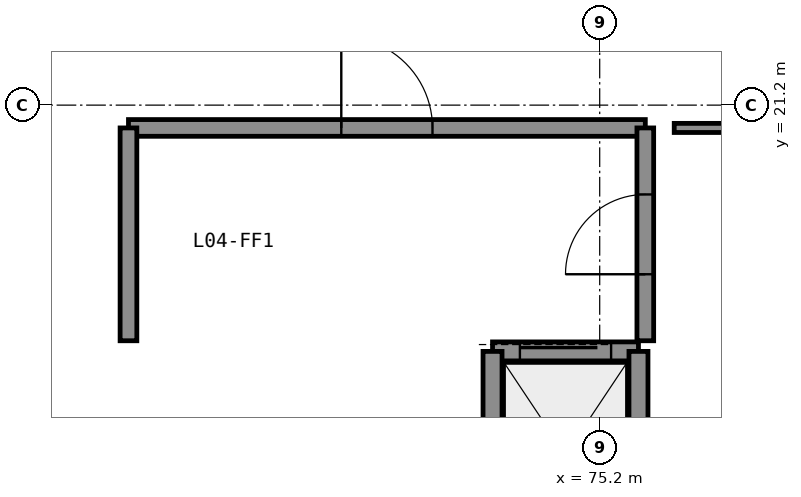
"""IFC4 building model, lengths in metres.
Left out: names, types, materials, properties, quantities, classifications, styles, units other than length and angle.
Written with IfcOpenShell. Run it as: python <this file> out.ifc"""

import sys

from ifc_helpers import new_model, si_unit, direction, frame, frame_2d, origin, place, context, subcontext, project, spatial, rectangle, extrude, element, fill, save


model = new_model("IFC4")
c1 = context("Model", 3, precision=1e-05, world=origin(), true_north=direction((0.0, 1.0)))
c2 = subcontext(c1, "Body", "Model", "MODEL_VIEW")
j1 = project(units=[si_unit("LENGTHUNIT", "METRE"), si_unit("PLANEANGLEUNIT", "RADIAN")], contexts=[c1])
p1 = place(None, origin())
s1 = spatial("IfcSite", under=j1, at=p1, CompositionType="ELEMENT")
p2 = place(p1, origin())
s2 = spatial("IfcBuilding", under=s1, at=p2, CompositionType="ELEMENT")
p3 = place(p2, frame((0.0, 0.0, 18.0)))
s3 = spatial("IfcBuildingStorey", under=s2, at=p3, CompositionType="ELEMENT", Elevation=18.0)
p4 = place(p3, frame((69.0, 20.9, 0.0), z_axis=(0.0, 0.0, 1.0), x_axis=(1.0, 0.0, 0.0)))
e1 = element("IfcWall", 1, at=p4, inside=s3, PredefinedType="SOLIDWALL", context=c2, shape_type="SweptSolid", body=[
    extrude(rectangle(XDim=6.8, YDim=0.22, at=frame_2d((3.4, 0.0))), origin(), (0.0, 0.0, 1.0), 3.95),
])
p5 = place(p4, frame((2.8, 0.0, 0.0)))
e2 = element("IfcOpeningElement", 2, at=p5, cuts=e1, PredefinedType="OPENING", context=c2, shape_type="SweptSolid", body=[
    extrude(rectangle(XDim=1.2, YDim=2.1, at=frame_2d((0.6, 1.05))), frame((0.0, 0.12, 0.0), z_axis=(0.0, -1.0, 0.0), x_axis=(1.0, 0.0, 0.0)), (0.0, 0.0, 1.0), 0.24),
])
p6 = place(p3, frame((69.0, 18.1, 0.0), z_axis=(0.0, 0.0, 1.0), x_axis=(0.0, 1.0, 0.0)))
e3 = element("IfcWall", 3, at=p6, inside=s3, PredefinedType="SOLIDWALL", context=c2, shape_type="SweptSolid", body=[
    extrude(rectangle(XDim=2.8, YDim=0.22, at=frame_2d((1.4, 0.0))), origin(), (0.0, 0.0, 1.0), 3.95),
])
p7 = place(p3, frame((75.8, 18.1, 0.0), z_axis=(0.0, 0.0, 1.0), x_axis=(0.0, 1.0, 0.0)))
e4 = element("IfcWall", 4, at=p7, inside=s3, PredefinedType="SOLIDWALL", context=c2, shape_type="SweptSolid", body=[
    extrude(rectangle(XDim=2.8, YDim=0.22, at=frame_2d((1.4, 0.0))), origin(), (0.0, 0.0, 1.0), 3.95),
])
p8 = place(p7, frame((0.875, 0.0, 0.0)))
e5 = element("IfcOpeningElement", 5, at=p8, cuts=e4, PredefinedType="OPENING", context=c2, shape_type="SweptSolid", body=[
    extrude(rectangle(XDim=1.05, YDim=2.1, at=frame_2d((0.525, 1.05))), frame((0.0, 0.12, 0.0), z_axis=(0.0, -1.0, 0.0), x_axis=(1.0, 0.0, 0.0)), (0.0, 0.0, 1.0), 0.24),
])
p9 = place(p3, frame((73.79, 17.96, 0.0), z_axis=(0.0, 0.0, 1.0), x_axis=(1.0, 0.0, 0.0)))
e6 = element("IfcWall", 6, at=p9, inside=s3, PredefinedType="SHEAR", context=c2, shape_type="SweptSolid", body=[
    extrude(rectangle(XDim=1.92, YDim=0.25, at=frame_2d((0.96, 0.0))), origin(), (0.0, 0.0, 1.0), 3.96),
])
p10 = place(p9, frame((0.36, 0.0, 0.0)))
e7 = element("IfcOpeningElement", 7, at=p10, cuts=e6, PredefinedType="OPENING", context=c2, shape_type="SweptSolid", body=[
    extrude(rectangle(XDim=1.2, YDim=2.2, at=frame_2d((0.6, 1.1))), frame((0.0, 0.135, 0.0), z_axis=(0.0, -1.0, 0.0), x_axis=(1.0, 0.0, 0.0)), (0.0, 0.0, 1.0), 0.27),
])
for number, where, z_axis, x_axis in (
    (8, (73.79, 15.24, 0.0), (0.0, 0.0, 1.0), (0.0, 1.0, 0.0)),
    (9, (75.71, 15.24, 0.0), (0.0, 0.0, 1.0), (0.0, 1.0, 0.0)),
):
    element("IfcWall", number, at=place(p3, frame(where, z_axis=z_axis, x_axis=x_axis)), inside=s3, PredefinedType="SHEAR", context=c2, shape_type="SweptSolid", body=[
        extrude(rectangle(XDim=2.72, YDim=0.25, at=frame_2d((1.36, 0.0))), origin(), (0.0, 0.0, 1.0), 3.96),
    ])
p11 = place(p3, frame((92.419, 20.9, 0.0), z_axis=(0.0, 0.0, 1.0), x_axis=(-1.0, 0.0, 0.0)))
e10 = element("IfcWall", 10, at=p11, inside=s3, PredefinedType="PARTITIONING", context=c2, shape_type="SweptSolid", body=[
    extrude(rectangle(XDim=16.239, YDim=0.12, at=frame_2d((8.12, 0.0))), origin(), (0.0, 0.0, 1.0), 3.95),
])
p12 = place(p11, frame((6.594, 0.0, 0.0)))
e11 = element("IfcOpeningElement", 11, at=p12, cuts=e10, PredefinedType="OPENING", context=c2, shape_type="SweptSolid", body=[
    extrude(rectangle(XDim=1.45, YDim=2.18, at=frame_2d((0.725, 1.09))), frame((0.0, 0.07, 0.0), z_axis=(0.0, -1.0, 0.0), x_axis=(1.0, 0.0, 0.0)), (0.0, 0.0, 1.0), 0.14),
])
p13 = place(p5, origin())
e12 = element("IfcDoor", 12, at=p13, inside=s3, OperationType="SINGLE_SWING_LEFT", PredefinedType="DOOR", context=c2, shape_type="SweptSolid", body=[
    extrude(rectangle(XDim=1.2, YDim=2.1, at=frame_2d((0.6, 1.05))), frame((0.0, 0.025, 0.0), z_axis=(0.0, -1.0, 0.0), x_axis=(1.0, 0.0, 0.0)), (0.0, 0.0, 1.0), 0.05),
])
fill(e2, e12)
p14 = place(p8, origin())
e13 = element("IfcDoor", 13, at=p14, inside=s3, OperationType="SINGLE_SWING_LEFT", PredefinedType="DOOR", context=c2, shape_type="SweptSolid", body=[
    extrude(rectangle(XDim=1.05, YDim=2.1, at=frame_2d((0.525, 1.05))), frame((0.0, 0.025, 0.0), z_axis=(0.0, -1.0, 0.0), x_axis=(1.0, 0.0, 0.0)), (0.0, 0.0, 1.0), 0.05),
])
fill(e5, e13)
p15 = place(p10, origin())
e14 = element("IfcDoor", 14, at=p15, inside=s3, OperationType="SLIDING_TO_LEFT", PredefinedType="DOOR", context=c2, shape_type="SweptSolid", body=[
    extrude(rectangle(XDim=1.2, YDim=2.2, at=frame_2d((0.6, 1.1))), frame((0.0, 0.025, 0.0), z_axis=(0.0, -1.0, 0.0), x_axis=(1.0, 0.0, 0.0)), (0.0, 0.0, 1.0), 0.05),
])
fill(e7, e14)
save(model, sys.argv[1])
